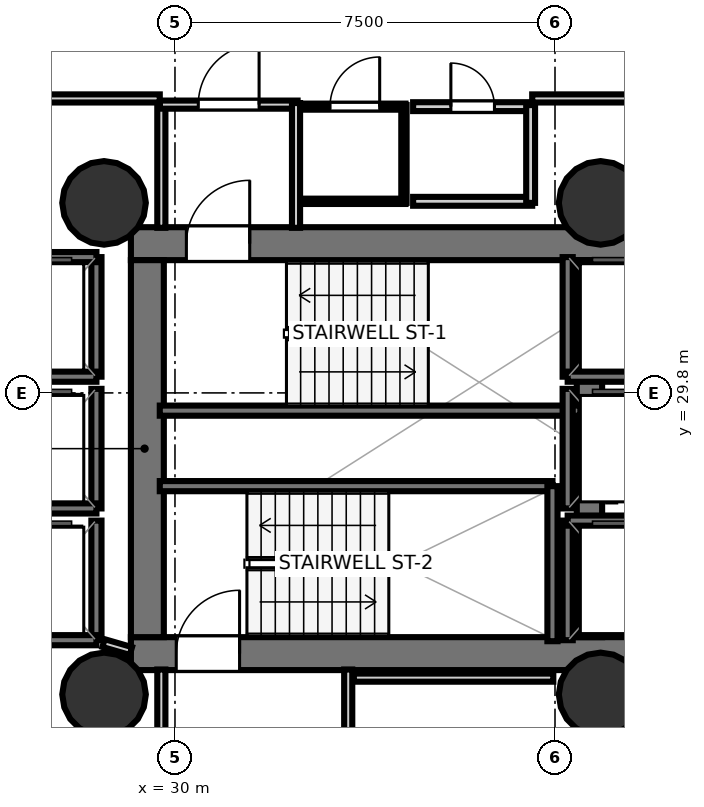
"""IFC4 building model, lengths in metres.
Left out: names, types, materials, properties, quantities, classifications, styles, units other than length and angle.
Written with IfcOpenShell. Run it as: python <this file> out.ifc"""

import sys

from ifc_helpers import new_model, si_unit, direction, frame, frame_2d, origin, origin_2d, place, context, subcontext, project, spatial, rectangle, hollow_circle, extrude, element, fill, save


model = new_model("IFC4")
c1 = context("Model", 3, precision=1e-05, world=origin(), true_north=direction((0.0, 1.0)))
c2 = subcontext(c1, "Body", "Model", "MODEL_VIEW")
j1 = project(units=[si_unit("LENGTHUNIT", "METRE"), si_unit("PLANEANGLEUNIT", "RADIAN")], contexts=[c1])
p1 = place(None, origin())
s1 = spatial("IfcSite", under=j1, at=p1, CompositionType="ELEMENT")
p2 = place(p1, origin())
s2 = spatial("IfcBuilding", under=s1, at=p2, CompositionType="ELEMENT")
p3 = place(p2, frame((0.0, 0.0, 89.5)))
s3 = spatial("IfcBuildingStorey", under=s2, at=p3, CompositionType="ELEMENT", Elevation=89.5)
p4 = place(p3, frame((29.13, 32.745, 0.0), z_axis=(0.0, 0.0, 1.0), x_axis=(1.0, 0.0, 0.0)))
e1 = element("IfcWall", 1, at=p4, inside=s3, PredefinedType="SHEAR", context=c2, shape_type="SweptSolid", body=[
    extrude(rectangle(XDim=10.72, YDim=0.65, at=frame_2d((5.36, 0.0))), origin(), (0.0, 0.0, 1.0), 3.4),
])
p5 = place(p4, frame((1.095, 0.0, 0.0)))
e2 = element("IfcOpeningElement", 2, at=p5, cuts=e1, PredefinedType="OPENING", context=c2, shape_type="SweptSolid", body=[
    extrude(rectangle(XDim=1.25, YDim=2.15, at=frame_2d((0.625, 1.075))), frame((0.0, 0.335, 0.0), z_axis=(0.0, -1.0, 0.0), x_axis=(1.0, 0.0, 0.0)), (0.0, 0.0, 1.0), 0.67),
])
p6 = place(p3, frame((29.13, 24.655, 0.0), z_axis=(0.0, 0.0, 1.0), x_axis=(1.0, 0.0, 0.0)))
e3 = element("IfcWall", 3, at=p6, inside=s3, PredefinedType="SHEAR", context=c2, shape_type="SweptSolid", body=[
    extrude(rectangle(XDim=10.72, YDim=0.65, at=frame_2d((5.36, 0.0))), origin(), (0.0, 0.0, 1.0), 3.4),
])
p7 = place(p6, frame((0.895, 0.0, 0.0)))
e4 = element("IfcOpeningElement", 4, at=p7, cuts=e3, PredefinedType="OPENING", context=c2, shape_type="SweptSolid", body=[
    extrude(rectangle(XDim=1.25, YDim=2.15, at=frame_2d((0.625, 1.075))), frame((0.0, 0.335, 0.0), z_axis=(0.0, -1.0, 0.0), x_axis=(1.0, 0.0, 0.0)), (0.0, 0.0, 1.0), 0.67),
])
p8 = place(p3, frame((29.455, 24.98, 0.0), z_axis=(0.0, 0.0, 1.0), x_axis=(0.0, 1.0, 0.0)))
e5 = element("IfcWall", 5, at=p8, inside=s3, PredefinedType="SHEAR", context=c2, shape_type="SweptSolid", body=[
    extrude(rectangle(XDim=7.44, YDim=0.65, at=frame_2d((3.72, 0.0))), origin(), (0.0, 0.0, 1.0), 3.4),
])
p9 = place(p3, frame((38.18, 24.98, 0.0), z_axis=(0.0, 0.0, 1.0), x_axis=(0.0, 1.0, 0.0)))
e6 = element("IfcWall", 6, at=p9, inside=s3, PredefinedType="SHEAR", context=c2, shape_type="SweptSolid", body=[
    extrude(rectangle(XDim=7.44, YDim=0.5, at=frame_2d((3.72, 0.0))), origin(), (0.0, 0.0, 1.0), 3.4),
])
for number, where, z_axis, x_axis in (
    (7, (28.6, 33.55, 0.0), (0.0, 0.0, 1.0), (1.0, 0.0, 0.0)),
    (8, (28.6, 23.85, 0.0), (0.0, 0.0, 1.0), (1.0, 0.0, 0.0)),
    (9, (38.4, 33.55, 0.0), (0.0, 0.0, 1.0), (1.0, 0.0, 0.0)),
    (10, (38.4, 23.85, 0.0), (0.0, 0.0, 1.0), (1.0, 0.0, 0.0)),
):
    element("IfcColumn", number, at=place(p3, frame(where, z_axis=z_axis, x_axis=x_axis)), inside=s3, PredefinedType="COLUMN", context=c2, shape_type="SweptSolid", body=[
        extrude(hollow_circle(Radius=0.825, WallThickness=0.04, at=origin_2d()), origin(), (0.0, 0.0, 1.0), 3.7),
    ])
p10 = place(p3, frame((29.7, 29.45, 0.0), z_axis=(0.0, 0.0, 1.0), x_axis=(1.0, 0.0, 0.0)))
e11 = element("IfcWall", 11, at=p10, inside=s3, PredefinedType="SOLIDWALL", context=c2, shape_type="SweptSolid", body=[
    extrude(rectangle(XDim=8.3, YDim=0.2, at=frame_2d((4.15, 0.0))), origin(), (0.0, 0.0, 1.0), 3.4),
])
p11 = place(p3, frame((29.7, 27.96, 0.0), z_axis=(0.0, 0.0, 1.0), x_axis=(1.0, 0.0, 0.0)))
e12 = element("IfcWall", 12, at=p11, inside=s3, PredefinedType="SOLIDWALL", context=c2, shape_type="SweptSolid", body=[
    extrude(rectangle(XDim=7.75, YDim=0.2, at=frame_2d((3.875, 0.0))), origin(), (0.0, 0.0, 1.0), 3.4),
])
p12 = place(p3, frame((37.45, 24.9, 0.0), z_axis=(0.0, 0.0, 1.0), x_axis=(0.0, 1.0, 0.0)))
e13 = element("IfcWall", 13, at=p12, inside=s3, PredefinedType="SOLIDWALL", context=c2, shape_type="SweptSolid", body=[
    extrude(rectangle(XDim=3.06, YDim=0.2, at=frame_2d((1.53, 0.0))), origin(), (0.0, 0.0, 1.0), 3.4),
])
p13 = place(p3, frame((37.75, 30.12, 0.0), z_axis=(0.0, 0.0, 1.0), x_axis=(0.0, 1.0, 0.0)))
e14 = element("IfcWall", 14, at=p13, inside=s3, PredefinedType="SOLIDWALL", context=c2, shape_type="SweptSolid", body=[
    extrude(rectangle(XDim=2.36, YDim=0.2, at=frame_2d((1.18, 0.0))), origin(), (0.0, 0.0, 1.0), 3.4),
])
p14 = place(p3, frame((37.75, 30.12, 0.0), z_axis=(0.0, 0.0, 1.0), x_axis=(1.0, 0.0, 0.0)))
e15 = element("IfcWall", 15, at=p14, inside=s3, PredefinedType="SOLIDWALL", context=c2, shape_type="SweptSolid", body=[
    extrude(rectangle(XDim=2.1, YDim=0.2, at=frame_2d((1.05, 0.0))), origin(), (0.0, 0.0, 1.0), 3.4),
])
p15 = place(p3, frame((37.75, 24.92, 0.0), z_axis=(0.0, 0.0, 1.0), x_axis=(0.0, 1.0, 0.0)))
e16 = element("IfcWall", 16, at=p15, inside=s3, PredefinedType="SOLIDWALL", context=c2, shape_type="SweptSolid", body=[
    extrude(rectangle(XDim=2.36, YDim=0.2, at=frame_2d((1.18, 0.0))), origin(), (0.0, 0.0, 1.0), 3.4),
])
p16 = place(p3, frame((37.75, 27.28, 0.0), z_axis=(0.0, 0.0, 1.0), x_axis=(1.0, 0.0, 0.0)))
e17 = element("IfcWall", 17, at=p16, inside=s3, PredefinedType="SOLIDWALL", context=c2, shape_type="SweptSolid", body=[
    extrude(rectangle(XDim=2.1, YDim=0.2, at=frame_2d((1.05, 0.0))), origin(), (0.0, 0.0, 1.0), 3.4),
])
p17 = place(p3, frame((28.45, 30.12, 0.0), z_axis=(0.0, 0.0, 1.0), x_axis=(0.0, 1.0, 0.0)))
e18 = element("IfcWall", 18, at=p17, inside=s3, PredefinedType="SOLIDWALL", context=c2, shape_type="SweptSolid", body=[
    extrude(rectangle(XDim=2.36, YDim=0.2, at=frame_2d((1.18, 0.0))), origin(), (0.0, 0.0, 1.0), 3.4),
])
for number, where, z_axis, x_axis in (
    (19, (26.35, 32.48, 0.0), (0.0, 0.0, 1.0), (1.0, 0.0, 0.0)),
    (20, (26.35, 30.12, 0.0), (0.0, 0.0, 1.0), (1.0, 0.0, 0.0)),
):
    element("IfcWall", number, at=place(p3, frame(where, z_axis=z_axis, x_axis=x_axis)), inside=s3, PredefinedType="SOLIDWALL", context=c2, shape_type="SweptSolid", body=[
        extrude(rectangle(XDim=2.1, YDim=0.2, at=frame_2d((1.05, 0.0))), origin(), (0.0, 0.0, 1.0), 3.4),
    ])
p18 = place(p3, frame((28.45, 27.52, 0.0), z_axis=(0.0, 0.0, 1.0), x_axis=(0.0, 1.0, 0.0)))
e21 = element("IfcWall", 21, at=p18, inside=s3, PredefinedType="SOLIDWALL", context=c2, shape_type="SweptSolid", body=[
    extrude(rectangle(XDim=2.36, YDim=0.2, at=frame_2d((1.18, 0.0))), origin(), (0.0, 0.0, 1.0), 3.4),
])
p19 = place(p3, frame((26.35, 27.52, 0.0), z_axis=(0.0, 0.0, 1.0), x_axis=(1.0, 0.0, 0.0)))
e22 = element("IfcWall", 22, at=p19, inside=s3, PredefinedType="SOLIDWALL", context=c2, shape_type="SweptSolid", body=[
    extrude(rectangle(XDim=2.1, YDim=0.2, at=frame_2d((1.05, 0.0))), origin(), (0.0, 0.0, 1.0), 3.4),
])
p20 = place(p3, frame((28.45, 24.92, 0.0), z_axis=(0.0, 0.0, 1.0), x_axis=(0.0, 1.0, 0.0)))
e23 = element("IfcWall", 23, at=p20, inside=s3, PredefinedType="SOLIDWALL", context=c2, shape_type="SweptSolid", body=[
    extrude(rectangle(XDim=2.36, YDim=0.2, at=frame_2d((1.18, 0.0))), origin(), (0.0, 0.0, 1.0), 3.4),
])
p21 = place(p3, frame((26.35, 24.92, 0.0), z_axis=(0.0, 0.0, 1.0), x_axis=(1.0, 0.0, 0.0)))
e24 = element("IfcWall", 24, at=p21, inside=s3, PredefinedType="SOLIDWALL", context=c2, shape_type="SweptSolid", body=[
    extrude(rectangle(XDim=2.1, YDim=0.2, at=frame_2d((1.05, 0.0))), origin(), (0.0, 0.0, 1.0), 3.4),
])
p22 = place(p3, frame((37.75, 27.52, 0.0), z_axis=(0.0, 0.0, 1.0), x_axis=(0.0, 1.0, 0.0)))
e25 = element("IfcWall", 25, at=p22, inside=s3, PredefinedType="SOLIDWALL", context=c2, shape_type="SweptSolid", body=[
    extrude(rectangle(XDim=2.36, YDim=0.2, at=frame_2d((1.18, 0.0))), origin(), (0.0, 0.0, 1.0), 3.4),
])
p23 = place(p3, frame((29.731, 33.058, 0.0), z_axis=(0.0, 0.0, 1.0), x_axis=(0.0, 1.0, 0.0)))
e26 = element("IfcWall", 26, at=p23, inside=s3, PredefinedType="PARTITIONING", context=c2, shape_type="SweptSolid", body=[
    extrude(rectangle(XDim=2.462, YDim=0.16, at=frame_2d((1.231, 0.0))), origin(), (0.0, 0.0, 1.0), 2.72),
])
p24 = place(p3, frame((29.7, 35.489, 0.0), z_axis=(0.0, 0.0, 1.0), x_axis=(1.0, 0.0, 0.0)))
e27 = element("IfcWall", 27, at=p24, inside=s3, PredefinedType="PARTITIONING", context=c2, shape_type="SweptSolid", body=[
    extrude(rectangle(XDim=2.72, YDim=0.16, at=frame_2d((1.36, 0.0))), origin(), (0.0, 0.0, 1.0), 2.72),
])
p25 = place(p24, frame((0.76, 0.0, 0.0)))
e28 = element("IfcOpeningElement", 28, at=p25, cuts=e27, PredefinedType="OPENING", context=c2, shape_type="SweptSolid", body=[
    extrude(rectangle(XDim=1.2, YDim=2.15, at=frame_2d((0.6, 1.075))), frame((0.0, 0.09, 0.0), z_axis=(0.0, -1.0, 0.0), x_axis=(1.0, 0.0, 0.0)), (0.0, 0.0, 1.0), 0.18),
])
p26 = place(p3, frame((32.389, 35.52, 0.0), z_axis=(0.0, 0.0, 1.0), x_axis=(0.0, -1.0, 0.0)))
e29 = element("IfcWall", 29, at=p26, inside=s3, PredefinedType="PARTITIONING", context=c2, shape_type="SweptSolid", body=[
    extrude(rectangle(XDim=2.462, YDim=0.16, at=frame_2d((1.231, 0.0))), origin(), (0.0, 0.0, 1.0), 2.72),
])
for number, where, z_axis, x_axis in (
    (30, (29.731, 21.85, 0.0), (0.0, 0.0, 1.0), (0.0, 1.0, 0.0)),
    (31, (33.419, 24.342, 0.0), (0.0, 0.0, 1.0), (0.0, -1.0, 0.0)),
):
    element("IfcWall", number, at=place(p3, frame(where, z_axis=z_axis, x_axis=x_axis)), inside=s3, PredefinedType="PARTITIONING", context=c2, shape_type="SweptSolid", body=[
        extrude(rectangle(XDim=2.492, YDim=0.16, at=frame_2d((1.246, 0.0))), origin(), (0.0, 0.0, 1.0), 2.72),
    ])
p27 = place(p3, frame((34.55, 33.581, 0.0), z_axis=(0.0, 0.0, 1.0), x_axis=(-1.0, 0.0, 0.0)))
e32 = element("IfcWall", 32, at=p27, inside=s3, PredefinedType="PARTITIONING", context=c2, shape_type="SweptSolid", body=[
    extrude(rectangle(XDim=2.0, YDim=0.105, at=frame_2d((1.0, 0.0))), origin(), (0.0, 0.0, 1.0), 2.72),
])
p28 = place(p3, frame((32.55, 35.449, 0.0), z_axis=(0.0, 0.0, 1.0), x_axis=(1.0, 0.0, 0.0)))
e33 = element("IfcWall", 33, at=p28, inside=s3, PredefinedType="PARTITIONING", context=c2, shape_type="SweptSolid", body=[
    extrude(rectangle(XDim=2.0, YDim=0.12, at=frame_2d((1.0, 0.0))), origin(), (0.0, 0.0, 1.0), 2.72),
])
p29 = place(p28, frame((0.51, 0.0, 0.0)))
e34 = element("IfcOpeningElement", 34, at=p29, cuts=e33, PredefinedType="OPENING", context=c2, shape_type="SweptSolid", body=[
    extrude(rectangle(XDim=0.98, YDim=2.1, at=frame_2d((0.49, 1.05))), frame((0.0, 0.07, 0.0), z_axis=(0.0, -1.0, 0.0), x_axis=(1.0, 0.0, 0.0)), (0.0, 0.0, 1.0), 0.14),
])
p30 = place(p3, frame((34.519, 35.48, 0.0), z_axis=(0.0, 0.0, 1.0), x_axis=(0.0, -1.0, 0.0)))
e35 = element("IfcWall", 35, at=p30, inside=s3, PredefinedType="PARTITIONING", context=c2, shape_type="SweptSolid", body=[
    extrude(rectangle(XDim=1.93, YDim=0.105, at=frame_2d((0.965, 0.0))), origin(), (0.0, 0.0, 1.0), 2.72),
])
p31 = place(p3, frame((37.05, 33.581, 0.0), z_axis=(0.0, 0.0, 1.0), x_axis=(-1.0, 0.0, 0.0)))
e36 = element("IfcWall", 36, at=p31, inside=s3, PredefinedType="PLUMBINGWALL", context=c2, shape_type="SweptSolid", body=[
    extrude(rectangle(XDim=2.35, YDim=0.175, at=frame_2d((1.175, 0.0))), origin(), (0.0, 0.0, 1.0), 2.72),
])
p32 = place(p3, frame((34.7, 35.449, 0.0), z_axis=(0.0, 0.0, 1.0), x_axis=(1.0, 0.0, 0.0)))
e37 = element("IfcWall", 37, at=p32, inside=s3, PredefinedType="PLUMBINGWALL", context=c2, shape_type="SweptSolid", body=[
    extrude(rectangle(XDim=2.35, YDim=0.175, at=frame_2d((1.175, 0.0))), origin(), (0.0, 0.0, 1.0), 2.72),
])
p33 = place(p32, frame((0.745, 0.0, 0.0)))
e38 = element("IfcOpeningElement", 38, at=p33, cuts=e37, PredefinedType="OPENING", context=c2, shape_type="SweptSolid", body=[
    extrude(rectangle(XDim=0.86, YDim=2.05, at=frame_2d((0.43, 1.025))), frame((0.0, 0.097, 0.0), z_axis=(0.0, -1.0, 0.0), x_axis=(1.0, 0.0, 0.0)), (0.0, 0.0, 1.0), 0.195),
])
p34 = place(p3, frame((37.019, 35.48, 0.0), z_axis=(0.0, 0.0, 1.0), x_axis=(0.0, -1.0, 0.0)))
e39 = element("IfcWall", 39, at=p34, inside=s3, PredefinedType="PLUMBINGWALL", context=c2, shape_type="SweptSolid", body=[
    extrude(rectangle(XDim=1.93, YDim=0.175, at=frame_2d((0.965, 0.0))), origin(), (0.0, 0.0, 1.0), 2.72),
])
p35 = place(p3, frame((29.13, 24.706, 0.0), z_axis=(0.0, 0.0, 1.0), x_axis=(-0.960451214223, 0.278448316742, 0.0)))
e40 = element("IfcWall", 40, at=p35, inside=s3, PredefinedType="PARTITIONING", context=c2, shape_type="SweptSolid", body=[
    extrude(rectangle(XDim=0.562, YDim=0.16, at=frame_2d((0.281, 0.0))), origin(), (0.0, 0.0, 1.0), 2.72),
])
p36 = place(p3, frame((37.467, 24.181, 0.0), z_axis=(0.0, 0.0, 1.0), x_axis=(-1.0, 0.0, 0.0)))
e41 = element("IfcWall", 41, at=p36, inside=s3, PredefinedType="PARTITIONING", context=c2, shape_type="SweptSolid", body=[
    extrude(rectangle(XDim=3.937, YDim=0.16, at=frame_2d((1.968, 0.0))), origin(), (0.0, 0.0, 1.0), 2.72),
])
p37 = place(p3, frame((39.818, 35.611, 0.0), z_axis=(0.0, 0.0, 1.0), x_axis=(-1.0, 0.0, 0.0)))
e42 = element("IfcWall", 42, at=p37, inside=s3, PredefinedType="PARTITIONING", context=c2, shape_type="SweptSolid", body=[
    extrude(rectangle(XDim=2.768, YDim=0.16, at=frame_2d((1.384, 0.0))), origin(), (0.0, 0.0, 1.0), 2.72),
])
p38 = place(p3, frame((29.7, 35.611, 0.0), z_axis=(0.0, 0.0, 1.0), x_axis=(-1.0, 0.0, 0.0)))
e43 = element("IfcWall", 43, at=p38, inside=s3, PredefinedType="PARTITIONING", context=c2, shape_type="SweptSolid", body=[
    extrude(rectangle(XDim=3.28, YDim=0.16, at=frame_2d((1.64, 0.0))), origin(), (0.0, 0.0, 1.0), 2.678),
])
p39 = place(p5, origin())
e44 = element("IfcDoor", 44, at=p39, inside=s3, OperationType="SINGLE_SWING_RIGHT", PredefinedType="DOOR", context=c2, shape_type="SweptSolid", body=[
    extrude(rectangle(XDim=1.25, YDim=2.15, at=frame_2d((0.625, 1.075))), frame((0.0, 0.025, 0.0), z_axis=(0.0, -1.0, 0.0), x_axis=(1.0, 0.0, 0.0)), (0.0, 0.0, 1.0), 0.05),
])
fill(e2, e44)
p40 = place(p7, origin())
e45 = element("IfcDoor", 45, at=p40, inside=s3, OperationType="SINGLE_SWING_RIGHT", PredefinedType="DOOR", context=c2, shape_type="SweptSolid", body=[
    extrude(rectangle(XDim=1.25, YDim=2.15, at=frame_2d((0.625, 1.075))), frame((0.0, 0.025, 0.0), z_axis=(0.0, -1.0, 0.0), x_axis=(1.0, 0.0, 0.0)), (0.0, 0.0, 1.0), 0.05),
])
fill(e4, e45)
p41 = place(p25, origin())
e46 = element("IfcDoor", 46, at=p41, inside=s3, OperationType="SINGLE_SWING_RIGHT", PredefinedType="DOOR", context=c2, shape_type="SweptSolid", body=[
    extrude(rectangle(XDim=1.2, YDim=2.15, at=frame_2d((0.6, 1.075))), frame((0.0, 0.025, 0.0), z_axis=(0.0, -1.0, 0.0), x_axis=(1.0, 0.0, 0.0)), (0.0, 0.0, 1.0), 0.05),
])
fill(e28, e46)
p42 = place(p29, origin())
e47 = element("IfcDoor", 47, at=p42, inside=s3, OperationType="SINGLE_SWING_RIGHT", PredefinedType="DOOR", context=c2, shape_type="SweptSolid", body=[
    extrude(rectangle(XDim=0.98, YDim=2.1, at=frame_2d((0.49, 1.05))), frame((0.0, 0.025, 0.0), z_axis=(0.0, -1.0, 0.0), x_axis=(1.0, 0.0, 0.0)), (0.0, 0.0, 1.0), 0.05),
])
fill(e34, e47)
p43 = place(p33, origin())
e48 = element("IfcDoor", 48, at=p43, inside=s3, OperationType="SINGLE_SWING_LEFT", PredefinedType="DOOR", context=c2, shape_type="SweptSolid", body=[
    extrude(rectangle(XDim=0.86, YDim=2.05, at=frame_2d((0.43, 1.025))), frame((0.0, 0.025, 0.0), z_axis=(0.0, -1.0, 0.0), x_axis=(1.0, 0.0, 0.0)), (0.0, 0.0, 1.0), 0.05),
])
fill(e38, e48)
save(model, sys.argv[1])
